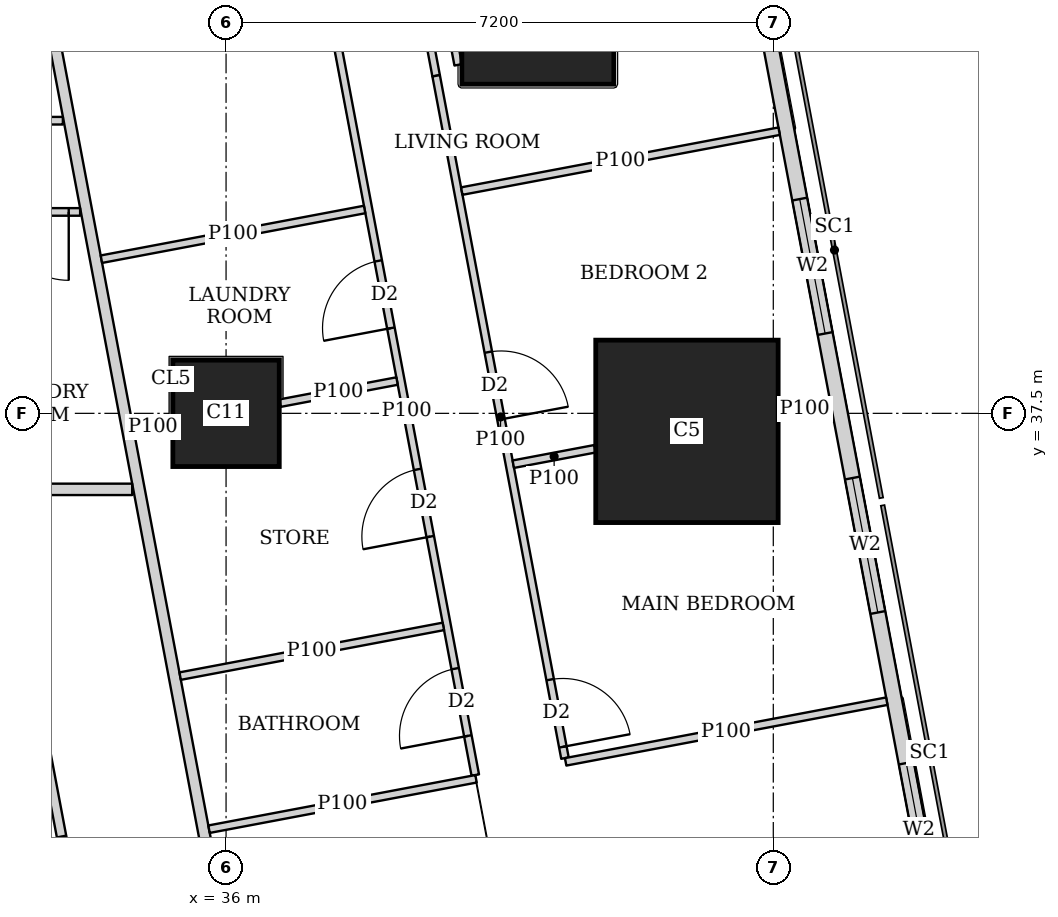
"""IFC4 building model, lengths in metres.
Left out: names, types, materials, properties, quantities, classifications, styles, units other than length and angle.
Written with IfcOpenShell. Run it as: python <this file> out.ifc"""

import sys

from ifc_helpers import new_model, si_unit, direction, frame, frame_2d, origin, origin_2d, place, context, subcontext, project, spatial, rectangle, extrude, element, fill, save


model = new_model("IFC4")
c1 = context("Model", 3, precision=1e-05, world=origin(), true_north=direction((0.0, 1.0)))
c2 = subcontext(c1, "Body", "Model", "MODEL_VIEW")
j1 = project(units=[si_unit("LENGTHUNIT", "METRE"), si_unit("PLANEANGLEUNIT", "RADIAN")], contexts=[c1])
p1 = place(None, origin())
s1 = spatial("IfcSite", under=j1, at=p1, CompositionType="ELEMENT")
p2 = place(p1, origin())
s2 = spatial("IfcBuilding", under=s1, at=p2, CompositionType="ELEMENT")
p3 = place(p2, frame((0.0, 0.0, 208.7)))
s3 = spatial("IfcBuildingStorey", under=s2, at=p3, CompositionType="ELEMENT", Elevation=208.7)
p4 = place(p3, frame((36.0, 37.5, 0.0), z_axis=(0.0, 0.0, 1.0), x_axis=(1.0, 0.0, 0.0)))
e1 = element("IfcColumn", 1, at=p4, inside=s3, PredefinedType="COLUMN", context=c2, shape_type="SweptSolid", body=[
    extrude(rectangle(XDim=1.4, YDim=1.4, at=origin_2d()), origin(), (0.0, 0.0, 1.0), 3.75),
])
p5 = place(p3, frame((42.064, 37.263, 0.0), z_axis=(0.0, 0.0, 1.0), x_axis=(1.0, 0.0, 0.0)))
e2 = element("IfcColumn", 2, at=p5, inside=s3, PredefinedType="COLUMN", context=c2, shape_type="SweptSolid", body=[
    extrude(rectangle(XDim=2.4, YDim=2.4, at=origin_2d()), origin(), (0.0, 0.0, 1.0), 3.75),
])
p6 = place(p3, frame((40.102, 42.83, 0.0), z_axis=(0.0, 0.0, 1.0), x_axis=(1.0, 0.0, 0.0)))
e3 = element("IfcColumn", 3, at=p6, inside=s3, PredefinedType="COLUMN", context=c2, shape_type="SweptSolid", body=[
    extrude(rectangle(XDim=2.0, YDim=2.0, at=origin_2d()), origin(), (0.0, 0.0, 1.0), 3.75),
])
p7 = place(p3, frame((50.653, 2.703, 0.0), z_axis=(0.0, 0.0, 1.0), x_axis=(-0.185612026696, 0.982623109613, 0.0)))
e4 = element("IfcWall", 4, at=p7, inside=s3, PredefinedType="SOLIDWALL", context=c2, shape_type="SweptSolid", body=[
    extrude(rectangle(XDim=41.393, YDim=0.2, at=frame_2d((20.697, 0.0))), origin(), (0.0, 0.0, 1.0), 3.5),
])
p8 = place(p7, frame((1.633, 0.0, 0.9)))
e5 = element("IfcOpeningElement", 5, at=p8, cuts=e4, PredefinedType="OPENING", context=c2, shape_type="SweptSolid", body=[
    extrude(rectangle(XDim=1.8, YDim=1.5, at=frame_2d((0.9, 0.75))), frame((0.0, 0.11, 0.0), z_axis=(0.0, -1.0, 0.0), x_axis=(1.0, 0.0, 0.0)), (0.0, 0.0, 1.0), 0.22),
])
p9 = place(p7, frame((6.032, 0.0, 0.9)))
e6 = element("IfcOpeningElement", 6, at=p9, cuts=e4, PredefinedType="OPENING", context=c2, shape_type="SweptSolid", body=[
    extrude(rectangle(XDim=1.8, YDim=1.5, at=frame_2d((0.9, 0.75))), frame((0.0, 0.11, 0.0), z_axis=(0.0, -1.0, 0.0), x_axis=(1.0, 0.0, 0.0)), (0.0, 0.0, 1.0), 0.22),
])
p10 = place(p7, frame((9.848, 0.0, 0.9)))
e7 = element("IfcOpeningElement", 7, at=p10, cuts=e4, PredefinedType="OPENING", context=c2, shape_type="SweptSolid", body=[
    extrude(rectangle(XDim=1.8, YDim=1.5, at=frame_2d((0.9, 0.75))), frame((0.0, 0.11, 0.0), z_axis=(0.0, -1.0, 0.0), x_axis=(1.0, 0.0, 0.0)), (0.0, 0.0, 1.0), 0.22),
])
p11 = place(p7, frame((13.664, 0.0, 0.9)))
e8 = element("IfcOpeningElement", 8, at=p11, cuts=e4, PredefinedType="OPENING", context=c2, shape_type="SweptSolid", body=[
    extrude(rectangle(XDim=1.8, YDim=1.5, at=frame_2d((0.9, 0.75))), frame((0.0, 0.11, 0.0), z_axis=(0.0, -1.0, 0.0), x_axis=(1.0, 0.0, 0.0)), (0.0, 0.0, 1.0), 0.22),
])
p12 = place(p7, frame((17.481, 0.0, 0.9)))
e9 = element("IfcOpeningElement", 9, at=p12, cuts=e4, PredefinedType="OPENING", context=c2, shape_type="SweptSolid", body=[
    extrude(rectangle(XDim=1.8, YDim=1.5, at=frame_2d((0.9, 0.75))), frame((0.0, 0.11, 0.0), z_axis=(0.0, -1.0, 0.0), x_axis=(1.0, 0.0, 0.0)), (0.0, 0.0, 1.0), 0.22),
])
p13 = place(p7, frame((21.297, 0.0, 0.9)))
e10 = element("IfcOpeningElement", 10, at=p13, cuts=e4, PredefinedType="OPENING", context=c2, shape_type="SweptSolid", body=[
    extrude(rectangle(XDim=1.8, YDim=1.5, at=frame_2d((0.9, 0.75))), frame((0.0, 0.11, 0.0), z_axis=(0.0, -1.0, 0.0), x_axis=(1.0, 0.0, 0.0)), (0.0, 0.0, 1.0), 0.22),
])
p14 = place(p7, frame((25.113, 0.0, 0.9)))
e11 = element("IfcOpeningElement", 11, at=p14, cuts=e4, PredefinedType="OPENING", context=c2, shape_type="SweptSolid", body=[
    extrude(rectangle(XDim=1.8, YDim=1.5, at=frame_2d((0.9, 0.75))), frame((0.0, 0.11, 0.0), z_axis=(0.0, -1.0, 0.0), x_axis=(1.0, 0.0, 0.0)), (0.0, 0.0, 1.0), 0.22),
])
p15 = place(p7, frame((28.93, 0.0, 0.9)))
e12 = element("IfcOpeningElement", 12, at=p15, cuts=e4, PredefinedType="OPENING", context=c2, shape_type="SweptSolid", body=[
    extrude(rectangle(XDim=1.8, YDim=1.5, at=frame_2d((0.9, 0.75))), frame((0.0, 0.11, 0.0), z_axis=(0.0, -1.0, 0.0), x_axis=(1.0, 0.0, 0.0)), (0.0, 0.0, 1.0), 0.22),
])
p16 = place(p7, frame((32.746, 0.0, 0.9)))
e13 = element("IfcOpeningElement", 13, at=p16, cuts=e4, PredefinedType="OPENING", context=c2, shape_type="SweptSolid", body=[
    extrude(rectangle(XDim=1.8, YDim=1.5, at=frame_2d((0.9, 0.75))), frame((0.0, 0.11, 0.0), z_axis=(0.0, -1.0, 0.0), x_axis=(1.0, 0.0, 0.0)), (0.0, 0.0, 1.0), 0.22),
])
p17 = place(p7, frame((36.481, 0.0, 0.9)))
e14 = element("IfcOpeningElement", 14, at=p17, cuts=e4, PredefinedType="OPENING", context=c2, shape_type="SweptSolid", body=[
    extrude(rectangle(XDim=1.8, YDim=1.5, at=frame_2d((0.9, 0.75))), frame((0.0, 0.11, 0.0), z_axis=(0.0, -1.0, 0.0), x_axis=(1.0, 0.0, 0.0)), (0.0, 0.0, 1.0), 0.22),
])
p18 = place(p3, frame((9.001, 36.5, 0.0), z_axis=(0.0, 0.0, 1.0), x_axis=(1.0, 0.0, 0.0)))
e15 = element("IfcWall", 15, at=p18, inside=s3, PredefinedType="SOLIDWALL", context=c2, shape_type="SweptSolid", body=[
    extrude(rectangle(XDim=25.764, YDim=0.15, at=frame_2d((12.882, 0.0))), origin(), (0.0, 0.0, 1.0), 3.5),
])
p19 = place(p18, frame((0.874, 0.0, 0.0)))
e16 = element("IfcOpeningElement", 16, at=p19, cuts=e15, PredefinedType="OPENING", context=c2, shape_type="SweptSolid", body=[
    extrude(rectangle(XDim=1.0, YDim=2.1, at=frame_2d((0.5, 1.05))), frame((0.0, 0.085, 0.0), z_axis=(0.0, -1.0, 0.0), x_axis=(1.0, 0.0, 0.0)), (0.0, 0.0, 1.0), 0.17),
])
p20 = place(p18, frame((10.099, 0.0, 0.0)))
e17 = element("IfcOpeningElement", 17, at=p20, cuts=e15, PredefinedType="OPENING", context=c2, shape_type="SweptSolid", body=[
    extrude(rectangle(XDim=1.0, YDim=2.1, at=frame_2d((0.5, 1.05))), frame((0.0, 0.085, 0.0), z_axis=(0.0, -1.0, 0.0), x_axis=(1.0, 0.0, 0.0)), (0.0, 0.0, 1.0), 0.17),
])
p21 = place(p18, frame((17.356, 0.0, 0.0)))
e18 = element("IfcOpeningElement", 18, at=p21, cuts=e15, PredefinedType="OPENING", context=c2, shape_type="SweptSolid", body=[
    extrude(rectangle(XDim=1.0, YDim=2.1, at=frame_2d((0.5, 1.05))), frame((0.0, 0.085, 0.0), z_axis=(0.0, -1.0, 0.0), x_axis=(1.0, 0.0, 0.0)), (0.0, 0.0, 1.0), 0.17),
])
p22 = place(p3, frame((33.68, 42.723, 0.0), z_axis=(0.0, 0.0, 1.0), x_axis=(0.185601160014, -0.982625162207, 0.0)))
e19 = element("IfcWall", 19, at=p22, inside=s3, PredefinedType="SOLIDWALL", context=c2, shape_type="SweptSolid", body=[
    extrude(rectangle(XDim=41.051, YDim=0.15, at=frame_2d((20.526, 0.0))), origin(), (0.0, 0.0, 1.0), 2.5),
])
p23 = place(p22, frame((12.307, 0.0, 0.0)))
e20 = element("IfcOpeningElement", 20, at=p23, cuts=e19, PredefinedType="OPENING", context=c2, shape_type="SweptSolid", body=[
    extrude(rectangle(XDim=1.0, YDim=2.1, at=frame_2d((0.5, 1.05))), frame((0.0, 0.085, 0.0), z_axis=(0.0, -1.0, 0.0), x_axis=(1.0, 0.0, 0.0)), (0.0, 0.0, 1.0), 0.17),
])
p24 = place(p22, frame((16.123, 0.0, 0.0)))
e21 = element("IfcOpeningElement", 21, at=p24, cuts=e19, PredefinedType="OPENING", context=c2, shape_type="SweptSolid", body=[
    extrude(rectangle(XDim=1.0, YDim=2.1, at=frame_2d((0.5, 1.05))), frame((0.0, 0.085, 0.0), z_axis=(0.0, -1.0, 0.0), x_axis=(1.0, 0.0, 0.0)), (0.0, 0.0, 1.0), 0.17),
])
p25 = place(p22, frame((30.902, 0.0, 0.0)))
e22 = element("IfcOpeningElement", 22, at=p25, cuts=e19, PredefinedType="OPENING", context=c2, shape_type="SweptSolid", body=[
    extrude(rectangle(XDim=1.0, YDim=2.1, at=frame_2d((0.5, 1.05))), frame((0.0, 0.085, 0.0), z_axis=(0.0, -1.0, 0.0), x_axis=(1.0, 0.0, 0.0)), (0.0, 0.0, 1.0), 0.17),
])
p26 = place(p3, frame((39.054, 42.085, 0.0), z_axis=(0.0, 0.0, 1.0), x_axis=(-0.185791584218, 0.982589175207, 0.0)))
e23 = element("IfcWall", 23, at=p26, inside=s3, PredefinedType="PARTITIONING", context=c2, shape_type="SweptSolid", body=[
    extrude(rectangle(XDim=3.628, YDim=0.1, at=frame_2d((1.814, 0.0))), origin(), (0.0, 0.0, 1.0), 2.05),
])
p27 = place(p3, frame((38.256, 44.628, 0.0), z_axis=(0.0, 0.0, 1.0), x_axis=(0.185700639943, -0.982606366927, 0.0)))
e24 = element("IfcWall", 24, at=p27, inside=s3, PredefinedType="PARTITIONING", context=c2, shape_type="SweptSolid", body=[
    extrude(rectangle(XDim=2.735, YDim=0.1, at=frame_2d((1.367, 0.0))), origin(), (0.0, 0.0, 1.0), 2.05),
])
p28 = place(p3, frame((38.764, 41.941, 0.0), z_axis=(0.0, 0.0, 1.0), x_axis=(0.185548572312, -0.982635093671, 0.0)))
e25 = element("IfcWall", 25, at=p28, inside=s3, PredefinedType="PARTITIONING", context=c2, shape_type="SweptSolid", body=[
    extrude(rectangle(XDim=9.135, YDim=0.1, at=frame_2d((4.568, 0.0))), origin(), (0.0, 0.0, 1.0), 3.5),
])
p29 = place(p28, frame((8.085, 0.0, 0.0)))
e26 = element("IfcOpeningElement", 26, at=p29, cuts=e25, PredefinedType="OPENING", context=c2, shape_type="SweptSolid", body=[
    extrude(rectangle(XDim=0.9, YDim=2.1, at=frame_2d((0.45, 1.05))), frame((0.0, 0.06, 0.0), z_axis=(0.0, -1.0, 0.0), x_axis=(1.0, 0.0, 0.0)), (0.0, 0.0, 1.0), 0.12),
])
p30 = place(p28, frame((3.7, 0.0, 0.0)))
e27 = element("IfcOpeningElement", 27, at=p30, cuts=e25, PredefinedType="OPENING", context=c2, shape_type="SweptSolid", body=[
    extrude(rectangle(XDim=0.9, YDim=2.1, at=frame_2d((0.45, 1.05))), frame((0.0, 0.06, 0.0), z_axis=(0.0, -1.0, 0.0), x_axis=(1.0, 0.0, 0.0)), (0.0, 0.0, 1.0), 0.12),
])
p31 = place(p3, frame((37.473, 42.309, 0.0), z_axis=(0.0, 0.0, 1.0), x_axis=(0.185491912953, -0.982645790827, 0.0)))
e28 = element("IfcWall", 28, at=p31, inside=s3, PredefinedType="PARTITIONING", context=c2, shape_type="SweptSolid", body=[
    extrude(rectangle(XDim=9.737, YDim=0.1, at=frame_2d((4.869, 0.0))), origin(), (0.0, 0.0, 1.0), 3.5),
])
p32 = place(p31, frame((8.312, 0.0, 0.0)))
e29 = element("IfcOpeningElement", 29, at=p32, cuts=e28, PredefinedType="OPENING", context=c2, shape_type="SweptSolid", body=[
    extrude(rectangle(XDim=0.9, YDim=2.1, at=frame_2d((0.45, 1.05))), frame((0.0, 0.06, 0.0), z_axis=(0.0, -1.0, 0.0), x_axis=(1.0, 0.0, 0.0)), (0.0, 0.0, 1.0), 0.12),
])
p33 = place(p31, frame((2.853, 0.0, 0.0)))
e30 = element("IfcOpeningElement", 30, at=p33, cuts=e28, PredefinedType="OPENING", context=c2, shape_type="SweptSolid", body=[
    extrude(rectangle(XDim=0.9, YDim=2.1, at=frame_2d((0.45, 1.05))), frame((0.0, 0.06, 0.0), z_axis=(0.0, -1.0, 0.0), x_axis=(1.0, 0.0, 0.0)), (0.0, 0.0, 1.0), 0.12),
])
p34 = place(p31, frame((5.644, 0.0, 0.0)))
e31 = element("IfcOpeningElement", 31, at=p34, cuts=e28, PredefinedType="OPENING", context=c2, shape_type="SweptSolid", body=[
    extrude(rectangle(XDim=0.9, YDim=2.1, at=frame_2d((0.45, 1.05))), frame((0.0, 0.06, 0.0), z_axis=(0.0, -1.0, 0.0), x_axis=(1.0, 0.0, 0.0)), (0.0, 0.0, 1.0), 0.12),
])
p35 = place(p3, frame((43.277, 41.212, 0.0), z_axis=(0.0, 0.0, 1.0), x_axis=(-0.982665405803, -0.185387972203, 0.0)))
e32 = element("IfcWall", 32, at=p35, inside=s3, PredefinedType="PARTITIONING", context=c2, shape_type="SweptSolid", body=[
    extrude(rectangle(XDim=4.25, YDim=0.1, at=frame_2d((2.125, 0.0))), origin(), (0.0, 0.0, 1.0), 2.05),
])
p36 = place(p3, frame((43.955, 37.62, 0.0), z_axis=(0.0, 0.0, 1.0), x_axis=(-0.982495415327, -0.186286765128, 0.0)))
e33 = element("IfcWall", 33, at=p36, inside=s3, PredefinedType="PARTITIONING", context=c2, shape_type="SweptSolid", body=[
    extrude(rectangle(XDim=0.693, YDim=0.1, at=frame_2d((0.347, 0.0))), origin(), (0.0, 0.0, 1.0), 3.5),
])
p37 = place(p3, frame((40.854, 37.034, 0.0), z_axis=(0.0, 0.0, 1.0), x_axis=(-0.982651678759, -0.185460718839, 0.0)))
e34 = element("IfcWall", 34, at=p37, inside=s3, PredefinedType="PARTITIONING", context=c2, shape_type="SweptSolid", body=[
    extrude(rectangle(XDim=1.094, YDim=0.1, at=frame_2d((0.547, 0.0))), origin(), (0.0, 0.0, 1.0), 3.5),
])
p38 = place(p3, frame((44.693, 33.713, 0.0), z_axis=(0.0, 0.0, 1.0), x_axis=(-0.982633535512, -0.185556823879, 0.0)))
e35 = element("IfcWall", 35, at=p38, inside=s3, PredefinedType="PARTITIONING", context=c2, shape_type="SweptSolid", body=[
    extrude(rectangle(XDim=4.3, YDim=0.1, at=frame_2d((2.15, 0.0))), origin(), (0.0, 0.0, 1.0), 2.05),
])
p39 = place(p3, frame((37.823, 40.182, 0.0), z_axis=(0.0, 0.0, 1.0), x_axis=(-0.98263926043, -0.185526504472, 0.0)))
e36 = element("IfcWall", 36, at=p39, inside=s3, PredefinedType="PARTITIONING", context=c2, shape_type="SweptSolid", body=[
    extrude(rectangle(XDim=3.524, YDim=0.1, at=frame_2d((1.762, 0.0))), origin(), (0.0, 0.0, 1.0), 3.5),
])
p40 = place(p3, frame((38.25, 37.925, 0.0), z_axis=(0.0, 0.0, 1.0), x_axis=(-0.982610209589, -0.185680305934, 0.0)))
e37 = element("IfcWall", 37, at=p40, inside=s3, PredefinedType="PARTITIONING", context=c2, shape_type="SweptSolid", body=[
    extrude(rectangle(XDim=1.567, YDim=0.1, at=frame_2d((0.784, 0.0))), origin(), (0.0, 0.0, 1.0), 3.5),
])
p41 = place(p3, frame((35.29, 37.366, 0.0), z_axis=(0.0, 0.0, 1.0), x_axis=(-0.982715597703, -0.185121727606, 0.0)))
e38 = element("IfcWall", 38, at=p41, inside=s3, PredefinedType="PARTITIONING", context=c2, shape_type="SweptSolid", body=[
    extrude(rectangle(XDim=0.513, YDim=0.1, at=frame_2d((0.256, 0.0))), origin(), (0.0, 0.0, 1.0), 3.5),
])
p42 = place(p3, frame((39.289, 32.692, 0.0), z_axis=(0.0, 0.0, 1.0), x_axis=(-0.982662827464, -0.185401638399, 0.0)))
e39 = element("IfcWall", 39, at=p42, inside=s3, PredefinedType="PARTITIONING", context=c2, shape_type="SweptSolid", body=[
    extrude(rectangle(XDim=3.575, YDim=0.1, at=frame_2d((1.788, 0.0))), origin(), (0.0, 0.0, 1.0), 3.5),
])
p43 = place(p3, frame((38.859, 34.697, 0.0), z_axis=(0.0, 0.0, 1.0), x_axis=(-0.982626628545, -0.185593396635, 0.0)))
e40 = element("IfcWall", 40, at=p43, inside=s3, PredefinedType="PARTITIONING", context=c2, shape_type="SweptSolid", body=[
    extrude(rectangle(XDim=3.524, YDim=0.1, at=frame_2d((1.762, 0.0))), origin(), (0.0, 0.0, 1.0), 3.5),
])
p44 = place(p3, frame((28.8, 41.35, 0.0), z_axis=(0.0, 0.0, 1.0), x_axis=(1.0, 0.0, 0.0)))
e41 = element("IfcWall", 41, at=p44, inside=s3, PredefinedType="PARTITIONING", context=c2, shape_type="SweptSolid", body=[
    extrude(rectangle(XDim=5.053, YDim=0.1, at=frame_2d((2.526, 0.0))), origin(), (0.0, 0.0, 1.0), 3.5),
])
p45 = place(p44, frame((1.25, 0.0, 0.0)))
e42 = element("IfcOpeningElement", 42, at=p45, cuts=e41, PredefinedType="OPENING", context=c2, shape_type="SweptSolid", body=[
    extrude(rectangle(XDim=0.9, YDim=2.1, at=frame_2d((0.45, 1.05))), frame((0.0, 0.06, 0.0), z_axis=(0.0, -1.0, 0.0), x_axis=(1.0, 0.0, 0.0)), (0.0, 0.0, 1.0), 0.12),
])
p46 = place(p3, frame((28.8, 40.15, 0.0), z_axis=(0.0, 0.0, 1.0), x_axis=(1.0, 0.0, 0.0)))
e43 = element("IfcWall", 43, at=p46, inside=s3, PredefinedType="PARTITIONING", context=c2, shape_type="SweptSolid", body=[
    extrude(rectangle(XDim=5.28, YDim=0.1, at=frame_2d((2.64, 0.0))), origin(), (0.0, 0.0, 1.0), 3.5),
])
p47 = place(p46, frame((0.575, 0.0, 0.0)))
e44 = element("IfcOpeningElement", 44, at=p47, cuts=e43, PredefinedType="OPENING", context=c2, shape_type="SweptSolid", body=[
    extrude(rectangle(XDim=0.9, YDim=2.1, at=frame_2d((0.45, 1.05))), frame((0.0, 0.06, 0.0), z_axis=(0.0, -1.0, 0.0), x_axis=(1.0, 0.0, 0.0)), (0.0, 0.0, 1.0), 0.12),
])
p48 = place(p46, frame((4.23, 0.0, 0.0)))
e45 = element("IfcOpeningElement", 45, at=p48, cuts=e43, PredefinedType="OPENING", context=c2, shape_type="SweptSolid", body=[
    extrude(rectangle(XDim=0.9, YDim=2.1, at=frame_2d((0.45, 1.05))), frame((0.0, 0.06, 0.0), z_axis=(0.0, -1.0, 0.0), x_axis=(1.0, 0.0, 0.0)), (0.0, 0.0, 1.0), 0.12),
])
p49 = place(p46, frame((2.375, 0.0, 0.0)))
e46 = element("IfcOpeningElement", 46, at=p49, cuts=e43, PredefinedType="OPENING", context=c2, shape_type="SweptSolid", body=[
    extrude(rectangle(XDim=0.9, YDim=2.1, at=frame_2d((0.45, 1.05))), frame((0.0, 0.06, 0.0), z_axis=(0.0, -1.0, 0.0), x_axis=(1.0, 0.0, 0.0)), (0.0, 0.0, 1.0), 0.12),
])
p50 = place(p3, frame((37.9, 10.413, 0.0), z_axis=(0.0, 0.0, 1.0), x_axis=(-0.185589740669, 0.982627319058, 0.0)))
e47 = element("IfcWall", 47, at=p50, inside=s3, PredefinedType="PARTITIONING", context=c2, shape_type="SweptSolid", body=[
    extrude(rectangle(XDim=24.602, YDim=0.125, at=frame_2d((12.301, 0.0))), origin(), (0.0, 0.0, 1.0), 2.5),
])
p51 = place(p50, frame((0.708, 0.0, 0.0)))
e48 = element("IfcOpeningElement", 48, at=p51, cuts=e47, PredefinedType="OPENING", context=c2, shape_type="SweptSolid", body=[
    extrude(rectangle(XDim=1.0, YDim=2.1, at=frame_2d((0.5, 1.05))), frame((0.0, 0.073, 0.0), z_axis=(0.0, -1.0, 0.0), x_axis=(1.0, 0.0, 0.0)), (0.0, 0.0, 1.0), 0.145),
])
p52 = place(p50, frame((5.65, 0.0, 0.0)))
e49 = element("IfcOpeningElement", 49, at=p52, cuts=e47, PredefinedType="OPENING", context=c2, shape_type="SweptSolid", body=[
    extrude(rectangle(XDim=1.0, YDim=2.1, at=frame_2d((0.5, 1.05))), frame((0.0, 0.073, 0.0), z_axis=(0.0, -1.0, 0.0), x_axis=(1.0, 0.0, 0.0)), (0.0, 0.0, 1.0), 0.145),
])
p53 = place(p50, frame((13.124, 0.0, 0.0)))
e50 = element("IfcOpeningElement", 50, at=p53, cuts=e47, PredefinedType="OPENING", context=c2, shape_type="SweptSolid", body=[
    extrude(rectangle(XDim=1.0, YDim=2.1, at=frame_2d((0.5, 1.05))), frame((0.0, 0.073, 0.0), z_axis=(0.0, -1.0, 0.0), x_axis=(1.0, 0.0, 0.0)), (0.0, 0.0, 1.0), 0.145),
])
p54 = place(p50, frame((16.94, 0.0, 0.0)))
e51 = element("IfcOpeningElement", 51, at=p54, cuts=e47, PredefinedType="OPENING", context=c2, shape_type="SweptSolid", body=[
    extrude(rectangle(XDim=1.0, YDim=2.1, at=frame_2d((0.5, 1.05))), frame((0.0, 0.073, 0.0), z_axis=(0.0, -1.0, 0.0), x_axis=(1.0, 0.0, 0.0)), (0.0, 0.0, 1.0), 0.145),
])
p55 = place(p50, frame((20.9, 0.0, 0.0)))
e52 = element("IfcOpeningElement", 52, at=p55, cuts=e47, PredefinedType="OPENING", context=c2, shape_type="SweptSolid", body=[
    extrude(rectangle(XDim=1.0, YDim=2.1, at=frame_2d((0.5, 1.05))), frame((0.0, 0.073, 0.0), z_axis=(0.0, -1.0, 0.0), x_axis=(1.0, 0.0, 0.0)), (0.0, 0.0, 1.0), 0.145),
])
p56 = place(p15, origin())
e53 = element("IfcWindow", 53, at=p56, inside=s3, PartitioningType="SINGLE_PANEL", PredefinedType="WINDOW", context=c2, shape_type="SweptSolid", body=[
    extrude(rectangle(XDim=1.8, YDim=1.5, at=frame_2d((0.9, 0.75))), frame((0.0, 0.03, 0.0), z_axis=(0.0, -1.0, 0.0), x_axis=(1.0, 0.0, 0.0)), (0.0, 0.0, 1.0), 0.06),
])
fill(e12, e53)
p57 = place(p16, origin())
e54 = element("IfcWindow", 54, at=p57, inside=s3, PartitioningType="SINGLE_PANEL", PredefinedType="WINDOW", context=c2, shape_type="SweptSolid", body=[
    extrude(rectangle(XDim=1.8, YDim=1.5, at=frame_2d((0.9, 0.75))), frame((0.0, 0.03, 0.0), z_axis=(0.0, -1.0, 0.0), x_axis=(1.0, 0.0, 0.0)), (0.0, 0.0, 1.0), 0.06),
])
fill(e13, e54)
p58 = place(p17, origin())
e55 = element("IfcWindow", 55, at=p58, inside=s3, PartitioningType="SINGLE_PANEL", PredefinedType="WINDOW", context=c2, shape_type="SweptSolid", body=[
    extrude(rectangle(XDim=1.8, YDim=1.5, at=frame_2d((0.9, 0.75))), frame((0.0, 0.03, 0.0), z_axis=(0.0, -1.0, 0.0), x_axis=(1.0, 0.0, 0.0)), (0.0, 0.0, 1.0), 0.06),
])
fill(e14, e55)
p59 = place(p29, origin())
e56 = element("IfcDoor", 56, at=p59, inside=s3, OperationType="SINGLE_SWING_RIGHT", PredefinedType="DOOR", context=c2, shape_type="SweptSolid", body=[
    extrude(rectangle(XDim=0.9, YDim=2.1, at=frame_2d((0.45, 1.05))), frame((0.0, 0.025, 0.0), z_axis=(0.0, -1.0, 0.0), x_axis=(1.0, 0.0, 0.0)), (0.0, 0.0, 1.0), 0.05),
])
fill(e26, e56)
p60 = place(p30, origin())
e57 = element("IfcDoor", 57, at=p60, inside=s3, OperationType="SINGLE_SWING_RIGHT", PredefinedType="DOOR", context=c2, shape_type="SweptSolid", body=[
    extrude(rectangle(XDim=0.9, YDim=2.1, at=frame_2d((0.45, 1.05))), frame((0.0, 0.025, 0.0), z_axis=(0.0, -1.0, 0.0), x_axis=(1.0, 0.0, 0.0)), (0.0, 0.0, 1.0), 0.05),
])
fill(e27, e57)
p61 = place(p32, origin())
e58 = element("IfcDoor", 58, at=p61, inside=s3, OperationType="SINGLE_SWING_LEFT", PredefinedType="DOOR", context=c2, shape_type="SweptSolid", body=[
    extrude(rectangle(XDim=0.9, YDim=2.1, at=frame_2d((0.45, 1.05))), frame((0.0, 0.025, 0.0), z_axis=(0.0, -1.0, 0.0), x_axis=(1.0, 0.0, 0.0)), (0.0, 0.0, 1.0), 0.05),
])
fill(e29, e58)
p62 = place(p33, origin())
e59 = element("IfcDoor", 59, at=p62, inside=s3, OperationType="SINGLE_SWING_LEFT", PredefinedType="DOOR", context=c2, shape_type="SweptSolid", body=[
    extrude(rectangle(XDim=0.9, YDim=2.1, at=frame_2d((0.45, 1.05))), frame((0.0, 0.025, 0.0), z_axis=(0.0, -1.0, 0.0), x_axis=(1.0, 0.0, 0.0)), (0.0, 0.0, 1.0), 0.05),
])
fill(e30, e59)
p63 = place(p34, origin())
e60 = element("IfcDoor", 60, at=p63, inside=s3, OperationType="SINGLE_SWING_LEFT", PredefinedType="DOOR", context=c2, shape_type="SweptSolid", body=[
    extrude(rectangle(XDim=0.9, YDim=2.1, at=frame_2d((0.45, 1.05))), frame((0.0, 0.025, 0.0), z_axis=(0.0, -1.0, 0.0), x_axis=(1.0, 0.0, 0.0)), (0.0, 0.0, 1.0), 0.05),
])
fill(e31, e60)
p64 = place(p48, origin())
e61 = element("IfcDoor", 61, at=p64, inside=s3, OperationType="SINGLE_SWING_LEFT", PredefinedType="DOOR", context=c2, shape_type="SweptSolid", body=[
    extrude(rectangle(XDim=0.9, YDim=2.1, at=frame_2d((0.45, 1.05))), frame((0.0, 0.025, 0.0), z_axis=(0.0, -1.0, 0.0), x_axis=(1.0, 0.0, 0.0)), (0.0, 0.0, 1.0), 0.05),
])
fill(e45, e61)
p65 = place(p55, origin())
e62 = element("IfcDoor", 62, at=p65, inside=s3, OperationType="SINGLE_SWING_LEFT", PredefinedType="DOOR", context=c2, shape_type="SweptSolid", body=[
    extrude(rectangle(XDim=1.0, YDim=2.1, at=frame_2d((0.5, 1.05))), frame((0.0, 0.025, 0.0), z_axis=(0.0, -1.0, 0.0), x_axis=(1.0, 0.0, 0.0)), (0.0, 0.0, 1.0), 0.05),
])
fill(e52, e62)
save(model, sys.argv[1])
